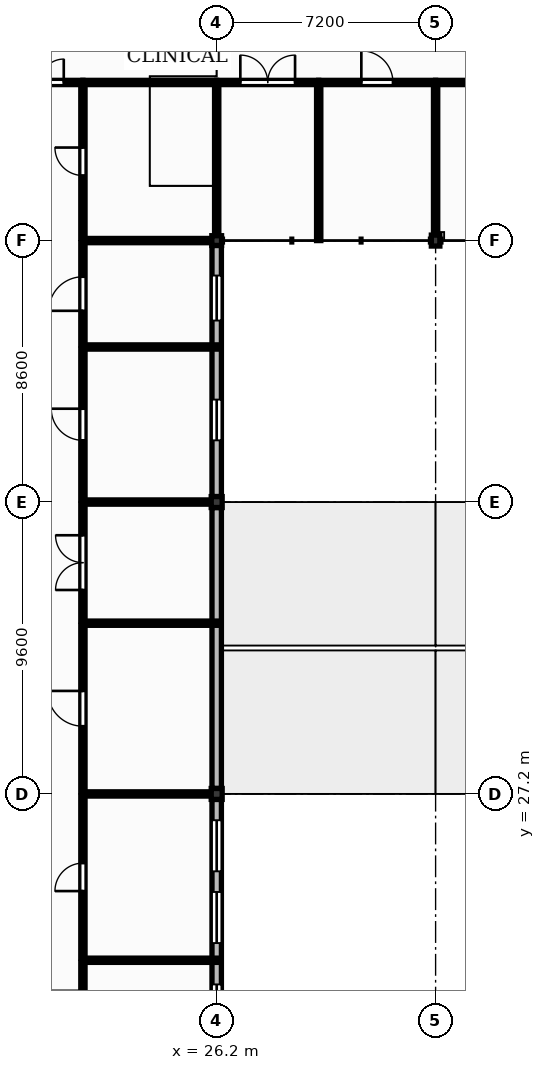
"""IFC4 building model, lengths in metres.
Left out: names, types, materials, properties, quantities, classifications, styles, units other than length and angle.
Written with IfcOpenShell. Run it as: python <this file> out.ifc"""

import sys

from ifc_helpers import new_model, si_unit, direction, frame, frame_2d, origin, origin_2d, place, context, subcontext, project, spatial, rectangle, extrude, element, fill, save


model = new_model("IFC4")
c1 = context("Model", 3, precision=1e-05, world=origin(), true_north=direction((0.0, 1.0)))
c2 = subcontext(c1, "Body", "Model", "MODEL_VIEW")
j1 = project(units=[si_unit("LENGTHUNIT", "METRE"), si_unit("PLANEANGLEUNIT", "RADIAN")], contexts=[c1])
p1 = place(None, origin())
s1 = spatial("IfcSite", under=j1, at=p1, CompositionType="ELEMENT")
p2 = place(p1, origin())
s2 = spatial("IfcBuilding", under=s1, at=p2, CompositionType="ELEMENT")
p3 = place(p2, frame((0.0, 0.0, 9.0)))
s3 = spatial("IfcBuildingStorey", under=s2, at=p3, CompositionType="ELEMENT", Elevation=9.0)
for number, where, z_axis, x_axis in (
    (1, (26.2, 27.2, 0.0), (0.0, 0.0, 1.0), (1.0, 0.0, 0.0)),
    (2, (26.2, 36.8, 0.0), (0.0, 0.0, 1.0), (1.0, 0.0, 0.0)),
):
    element("IfcColumn", number, at=place(p3, frame(where, z_axis=z_axis, x_axis=x_axis)), inside=s3, PredefinedType="COLUMN", context=c2, shape_type="SweptSolid", body=[
        extrude(rectangle(XDim=0.36, YDim=0.36, at=origin_2d()), origin(), (0.0, 0.0, 1.0), 3.95),
    ])
p4 = place(p3, frame((26.2, 45.4, 0.0), z_axis=(0.0, 0.0, 1.0), x_axis=(1.0, 0.0, 0.0)))
e3 = element("IfcColumn", 3, at=p4, inside=s3, PredefinedType="COLUMN", context=c2, shape_type="SweptSolid", body=[
    extrude(rectangle(XDim=0.32, YDim=0.32, at=origin_2d()), origin(), (0.0, 0.0, 1.0), 3.95),
])
p5 = place(p3, frame((33.4, 45.4, 0.0), z_axis=(0.0, 0.0, 1.0), x_axis=(1.0, 0.0, 0.0)))
e4 = element("IfcColumn", 4, at=p5, inside=s3, PredefinedType="COLUMN", context=c2, shape_type="SweptSolid", body=[
    extrude(rectangle(XDim=0.28, YDim=0.36, at=origin_2d()), origin(), (0.0, 0.0, 1.0), 3.99),
])
p6 = place(p3, frame((26.2, 18.78, 0.0), z_axis=(0.0, 0.0, 1.0), x_axis=(0.0, 1.0, 0.0)))
e5 = element("IfcWall", 5, at=p6, inside=s3, PredefinedType="SOLIDWALL", context=c2, shape_type="SweptSolid", body=[
    extrude(rectangle(XDim=8.24, YDim=0.31, at=frame_2d((4.12, 0.0))), origin(), (0.0, 0.0, 1.0), 3.49),
])
p7 = place(p6, frame((0.915, 0.0, 1.0)))
e6 = element("IfcOpeningElement", 6, at=p7, cuts=e5, PredefinedType="OPENING", context=c2, shape_type="SweptSolid", body=[
    extrude(rectangle(XDim=1.24, YDim=1.8, at=frame_2d((0.62, 0.9))), frame((0.0, 0.165, 0.0), z_axis=(0.0, -1.0, 0.0), x_axis=(1.0, 0.0, 0.0)), (0.0, 0.0, 1.0), 0.33),
])
p8 = place(p6, frame((3.515, 0.0, 1.5)))
e7 = element("IfcOpeningElement", 7, at=p8, cuts=e5, PredefinedType="OPENING", context=c2, shape_type="SweptSolid", body=[
    extrude(rectangle(XDim=1.68, YDim=1.25, at=frame_2d((0.84, 0.625))), frame((0.0, 0.165, 0.0), z_axis=(0.0, -1.0, 0.0), x_axis=(1.0, 0.0, 0.0)), (0.0, 0.0, 1.0), 0.33),
])
p9 = place(p6, frame((5.875, 0.0, 1.5)))
e8 = element("IfcOpeningElement", 8, at=p9, cuts=e5, PredefinedType="OPENING", context=c2, shape_type="SweptSolid", body=[
    extrude(rectangle(XDim=1.68, YDim=1.25, at=frame_2d((0.84, 0.625))), frame((0.0, 0.165, 0.0), z_axis=(0.0, -1.0, 0.0), x_axis=(1.0, 0.0, 0.0)), (0.0, 0.0, 1.0), 0.33),
])
p10 = place(p3, frame((26.2, 27.38, 0.0), z_axis=(0.0, 0.0, 1.0), x_axis=(0.0, 1.0, 0.0)))
e9 = element("IfcWall", 9, at=p10, inside=s3, PredefinedType="SOLIDWALL", context=c2, shape_type="SweptSolid", body=[
    extrude(rectangle(XDim=9.24, YDim=0.31, at=frame_2d((4.62, 0.0))), origin(), (0.0, 0.0, 1.0), 3.49),
])
p11 = place(p3, frame((26.2, 36.98, 0.0), z_axis=(0.0, 0.0, 1.0), x_axis=(0.0, 1.0, 0.0)))
e10 = element("IfcWall", 10, at=p11, inside=s3, PredefinedType="SOLIDWALL", context=c2, shape_type="SweptSolid", body=[
    extrude(rectangle(XDim=8.26, YDim=0.31, at=frame_2d((4.13, 0.0))), origin(), (0.0, 0.0, 1.0), 3.49),
])
p12 = place(p11, frame((1.85, 0.0, 1.0)))
e11 = element("IfcOpeningElement", 11, at=p12, cuts=e10, PredefinedType="OPENING", context=c2, shape_type="SweptSolid", body=[
    extrude(rectangle(XDim=1.34, YDim=1.95, at=frame_2d((0.67, 0.975))), frame((0.0, 0.165, 0.0), z_axis=(0.0, -1.0, 0.0), x_axis=(1.0, 0.0, 0.0)), (0.0, 0.0, 1.0), 0.33),
])
p13 = place(p11, frame((5.79, 0.0, 1.0)))
e12 = element("IfcOpeningElement", 12, at=p13, cuts=e10, PredefinedType="OPENING", context=c2, shape_type="SweptSolid", body=[
    extrude(rectangle(XDim=1.48, YDim=1.95, at=frame_2d((0.74, 0.975))), frame((0.0, 0.165, 0.0), z_axis=(0.0, -1.0, 0.0), x_axis=(1.0, 0.0, 0.0)), (0.0, 0.0, 1.0), 0.33),
])
p14 = place(p3, frame((19.0, 50.6, 0.0), z_axis=(0.0, 0.0, 1.0), x_axis=(1.0, 0.0, 0.0)))
e13 = element("IfcWall", 13, at=p14, inside=s3, PredefinedType="PARTITIONING", context=c2, shape_type="SweptSolid", body=[
    extrude(rectangle(XDim=2.8, YDim=0.14, at=frame_2d((1.4, 0.0))), origin(), (0.0, 0.0, 1.0), 3.96),
])
p15 = place(p14, frame((0.63, 0.0, 0.0)))
e14 = element("IfcOpeningElement", 14, at=p15, cuts=e13, PredefinedType="OPENING", context=c2, shape_type="SweptSolid", body=[
    extrude(rectangle(XDim=1.54, YDim=2.25, at=frame_2d((0.77, 1.125))), frame((0.0, 0.08, 0.0), z_axis=(0.0, -1.0, 0.0), x_axis=(1.0, 0.0, 0.0)), (0.0, 0.0, 1.0), 0.16),
])
p16 = place(p3, frame((21.8, 18.67, 0.0), z_axis=(0.0, 0.0, 1.0), x_axis=(0.0, 1.0, 0.0)))
e15 = element("IfcWall", 15, at=p16, inside=s3, PredefinedType="PARTITIONING", context=c2, shape_type="SweptSolid", body=[
    extrude(rectangle(XDim=2.99, YDim=0.14, at=frame_2d((1.495, 0.0))), origin(), (0.0, 0.0, 1.0), 3.96),
])
p17 = place(p16, frame((0.935, 0.0, 0.0)))
e16 = element("IfcOpeningElement", 16, at=p17, cuts=e15, PredefinedType="OPENING", context=c2, shape_type="SweptSolid", body=[
    extrude(rectangle(XDim=1.12, YDim=2.15, at=frame_2d((0.56, 1.075))), frame((0.0, 0.08, 0.0), z_axis=(0.0, -1.0, 0.0), x_axis=(1.0, 0.0, 0.0)), (0.0, 0.0, 1.0), 0.16),
])
p18 = place(p3, frame((21.8, 21.8, 0.0), z_axis=(0.0, 0.0, 1.0), x_axis=(0.0, 1.0, 0.0)))
e17 = element("IfcWall", 17, at=p18, inside=s3, PredefinedType="PARTITIONING", context=c2, shape_type="SweptSolid", body=[
    extrude(rectangle(XDim=5.33, YDim=0.14, at=frame_2d((2.665, 0.0))), origin(), (0.0, 0.0, 1.0), 3.96),
])
p19 = place(p18, frame((2.205, 0.0, 0.0)))
e18 = element("IfcOpeningElement", 18, at=p19, cuts=e17, PredefinedType="OPENING", context=c2, shape_type="SweptSolid", body=[
    extrude(rectangle(XDim=0.92, YDim=2.1, at=frame_2d((0.46, 1.05))), frame((0.0, 0.08, 0.0), z_axis=(0.0, -1.0, 0.0), x_axis=(1.0, 0.0, 0.0)), (0.0, 0.0, 1.0), 0.16),
])
p20 = place(p3, frame((21.8, 21.73, 0.0), z_axis=(0.0, 0.0, 1.0), x_axis=(1.0, 0.0, 0.0)))
e19 = element("IfcWall", 19, at=p20, inside=s3, PredefinedType="PARTITIONING", context=c2, shape_type="SweptSolid", body=[
    extrude(rectangle(XDim=4.4, YDim=0.14, at=frame_2d((2.2, 0.0))), origin(), (0.0, 0.0, 1.0), 3.96),
])
p21 = place(p3, frame((21.8, 27.27, 0.0), z_axis=(0.0, 0.0, 1.0), x_axis=(0.0, 1.0, 0.0)))
e20 = element("IfcWall", 20, at=p21, inside=s3, PredefinedType="PARTITIONING", context=c2, shape_type="SweptSolid", body=[
    extrude(rectangle(XDim=5.476, YDim=0.14, at=frame_2d((2.738, 0.0))), origin(), (0.0, 0.0, 1.0), 3.96),
])
p22 = place(p21, frame((2.158, 0.0, 0.0)))
e21 = element("IfcOpeningElement", 21, at=p22, cuts=e20, PredefinedType="OPENING", context=c2, shape_type="SweptSolid", body=[
    extrude(rectangle(XDim=1.16, YDim=2.1, at=frame_2d((0.58, 1.05))), frame((0.0, 0.08, 0.0), z_axis=(0.0, -1.0, 0.0), x_axis=(1.0, 0.0, 0.0)), (0.0, 0.0, 1.0), 0.16),
])
p23 = place(p3, frame((21.8, 27.2, 0.0), z_axis=(0.0, 0.0, 1.0), x_axis=(1.0, 0.0, 0.0)))
e22 = element("IfcWall", 22, at=p23, inside=s3, PredefinedType="PARTITIONING", context=c2, shape_type="SweptSolid", body=[
    extrude(rectangle(XDim=4.22, YDim=0.14, at=frame_2d((2.11, 0.0))), origin(), (0.0, 0.0, 1.0), 3.49),
])
p24 = place(p3, frame((21.8, 32.886, 0.0), z_axis=(0.0, 0.0, 1.0), x_axis=(0.0, 1.0, 0.0)))
e23 = element("IfcWall", 23, at=p24, inside=s3, PredefinedType="PARTITIONING", context=c2, shape_type="SweptSolid", body=[
    extrude(rectangle(XDim=3.844, YDim=0.14, at=frame_2d((1.922, 0.0))), origin(), (0.0, 0.0, 1.0), 3.96),
])
p25 = place(p24, frame((1.022, 0.0, 0.0)))
e24 = element("IfcOpeningElement", 24, at=p25, cuts=e23, PredefinedType="OPENING", context=c2, shape_type="SweptSolid", body=[
    extrude(rectangle(XDim=1.8, YDim=2.3, at=frame_2d((0.9, 1.15))), frame((0.0, 0.08, 0.0), z_axis=(0.0, -1.0, 0.0), x_axis=(1.0, 0.0, 0.0)), (0.0, 0.0, 1.0), 0.16),
])
p26 = place(p3, frame((21.8, 32.816, 0.0), z_axis=(0.0, 0.0, 1.0), x_axis=(1.0, 0.0, 0.0)))
e25 = element("IfcWall", 25, at=p26, inside=s3, PredefinedType="PARTITIONING", context=c2, shape_type="SweptSolid", body=[
    extrude(rectangle(XDim=4.4, YDim=0.14, at=frame_2d((2.2, 0.0))), origin(), (0.0, 0.0, 1.0), 3.96),
])
p27 = place(p3, frame((21.8, 36.87, 0.0), z_axis=(0.0, 0.0, 1.0), x_axis=(0.0, 1.0, 0.0)))
e26 = element("IfcWall", 26, at=p27, inside=s3, PredefinedType="PARTITIONING", context=c2, shape_type="SweptSolid", body=[
    extrude(rectangle(XDim=4.96, YDim=0.14, at=frame_2d((2.48, 0.0))), origin(), (0.0, 0.0, 1.0), 3.96),
])
p28 = place(p27, frame((1.96, 0.0, 0.0)))
e27 = element("IfcOpeningElement", 27, at=p28, cuts=e26, PredefinedType="OPENING", context=c2, shape_type="SweptSolid", body=[
    extrude(rectangle(XDim=1.04, YDim=2.1, at=frame_2d((0.52, 1.05))), frame((0.0, 0.08, 0.0), z_axis=(0.0, -1.0, 0.0), x_axis=(1.0, 0.0, 0.0)), (0.0, 0.0, 1.0), 0.16),
])
p29 = place(p3, frame((21.8, 36.8, 0.0), z_axis=(0.0, 0.0, 1.0), x_axis=(1.0, 0.0, 0.0)))
e28 = element("IfcWall", 28, at=p29, inside=s3, PredefinedType="PARTITIONING", context=c2, shape_type="SweptSolid", body=[
    extrude(rectangle(XDim=4.22, YDim=0.14, at=frame_2d((2.11, 0.0))), origin(), (0.0, 0.0, 1.0), 3.49),
])
p30 = place(p3, frame((21.8, 41.97, 0.0), z_axis=(0.0, 0.0, 1.0), x_axis=(0.0, 1.0, 0.0)))
e29 = element("IfcWall", 29, at=p30, inside=s3, PredefinedType="PARTITIONING", context=c2, shape_type="SweptSolid", body=[
    extrude(rectangle(XDim=3.36, YDim=0.14, at=frame_2d((1.68, 0.0))), origin(), (0.0, 0.0, 1.0), 3.96),
])
p31 = place(p30, frame((1.12, 0.0, 0.0)))
e30 = element("IfcOpeningElement", 30, at=p31, cuts=e29, PredefinedType="OPENING", context=c2, shape_type="SweptSolid", body=[
    extrude(rectangle(XDim=1.12, YDim=2.15, at=frame_2d((0.56, 1.075))), frame((0.0, 0.08, 0.0), z_axis=(0.0, -1.0, 0.0), x_axis=(1.0, 0.0, 0.0)), (0.0, 0.0, 1.0), 0.16),
])
p32 = place(p3, frame((21.8, 41.9, 0.0), z_axis=(0.0, 0.0, 1.0), x_axis=(1.0, 0.0, 0.0)))
e31 = element("IfcWall", 31, at=p32, inside=s3, PredefinedType="PARTITIONING", context=c2, shape_type="SweptSolid", body=[
    extrude(rectangle(XDim=4.4, YDim=0.14, at=frame_2d((2.2, 0.0))), origin(), (0.0, 0.0, 1.0), 3.96),
])
p33 = place(p3, frame((21.8, 45.47, 0.0), z_axis=(0.0, 0.0, 1.0), x_axis=(0.0, 1.0, 0.0)))
e32 = element("IfcWall", 32, at=p33, inside=s3, PredefinedType="PARTITIONING", context=c2, shape_type="SweptSolid", body=[
    extrude(rectangle(XDim=5.06, YDim=0.14, at=frame_2d((2.53, 0.0))), origin(), (0.0, 0.0, 1.0), 3.96),
])
p34 = place(p33, frame((2.07, 0.0, 0.0)))
e33 = element("IfcOpeningElement", 33, at=p34, cuts=e32, PredefinedType="OPENING", context=c2, shape_type="SweptSolid", body=[
    extrude(rectangle(XDim=0.92, YDim=2.1, at=frame_2d((0.46, 1.05))), frame((0.0, 0.08, 0.0), z_axis=(0.0, -1.0, 0.0), x_axis=(1.0, 0.0, 0.0)), (0.0, 0.0, 1.0), 0.16),
])
p35 = place(p3, frame((21.8, 45.4, 0.0), z_axis=(0.0, 0.0, 1.0), x_axis=(1.0, 0.0, 0.0)))
e34 = element("IfcWall", 34, at=p35, inside=s3, PredefinedType="PARTITIONING", context=c2, shape_type="SweptSolid", body=[
    extrude(rectangle(XDim=4.24, YDim=0.14, at=frame_2d((2.12, 0.0))), origin(), (0.0, 0.0, 1.0), 3.49),
])
p36 = place(p3, frame((21.8, 50.6, 0.0), z_axis=(0.0, 0.0, 1.0), x_axis=(1.0, 0.0, 0.0)))
e35 = element("IfcWall", 35, at=p36, inside=s3, PredefinedType="PARTITIONING", context=c2, shape_type="SweptSolid", body=[
    extrude(rectangle(XDim=4.4, YDim=0.14, at=frame_2d((2.2, 0.0))), origin(), (0.0, 0.0, 1.0), 3.96),
])
p37 = place(p3, frame((26.2, 45.56, 0.0), z_axis=(0.0, 0.0, 1.0), x_axis=(0.0, 1.0, 0.0)))
e36 = element("IfcWall", 36, at=p37, inside=s3, PredefinedType="PARTITIONING", context=c2, shape_type="SweptSolid", body=[
    extrude(rectangle(XDim=4.97, YDim=0.14, at=frame_2d((2.485, 0.0))), origin(), (0.0, 0.0, 1.0), 3.43),
])
p38 = place(p3, frame((26.2, 50.6, 0.0), z_axis=(0.0, 0.0, 1.0), x_axis=(1.0, 0.0, 0.0)))
e37 = element("IfcWall", 37, at=p38, inside=s3, PredefinedType="PARTITIONING", context=c2, shape_type="SweptSolid", body=[
    extrude(rectangle(XDim=3.355, YDim=0.14, at=frame_2d((1.677, 0.0))), origin(), (0.0, 0.0, 1.0), 3.96),
])
p39 = place(p38, frame((0.778, 0.0, 0.0)))
e38 = element("IfcOpeningElement", 38, at=p39, cuts=e37, PredefinedType="OPENING", context=c2, shape_type="SweptSolid", body=[
    extrude(rectangle(XDim=1.8, YDim=2.3, at=frame_2d((0.9, 1.15))), frame((0.0, 0.08, 0.0), z_axis=(0.0, -1.0, 0.0), x_axis=(1.0, 0.0, 0.0)), (0.0, 0.0, 1.0), 0.16),
])
p40 = place(p3, frame((29.555, 45.4, 0.0), z_axis=(0.0, 0.0, 1.0), x_axis=(0.0, 1.0, 0.0)))
e39 = element("IfcWall", 39, at=p40, inside=s3, PredefinedType="PARTITIONING", context=c2, shape_type="SweptSolid", body=[
    extrude(rectangle(XDim=5.13, YDim=0.14, at=frame_2d((2.565, 0.0))), origin(), (0.0, 0.0, 1.0), 3.96),
])
p41 = place(p3, frame((29.555, 50.6, 0.0), z_axis=(0.0, 0.0, 1.0), x_axis=(1.0, 0.0, 0.0)))
e40 = element("IfcWall", 40, at=p41, inside=s3, PredefinedType="PARTITIONING", context=c2, shape_type="SweptSolid", body=[
    extrude(rectangle(XDim=3.845, YDim=0.14, at=frame_2d((1.922, 0.0))), origin(), (0.0, 0.0, 1.0), 3.96),
])
p42 = place(p41, frame((1.403, 0.0, 0.0)))
e41 = element("IfcOpeningElement", 41, at=p42, cuts=e40, PredefinedType="OPENING", context=c2, shape_type="SweptSolid", body=[
    extrude(rectangle(XDim=1.04, YDim=2.1, at=frame_2d((0.52, 1.05))), frame((0.0, 0.08, 0.0), z_axis=(0.0, -1.0, 0.0), x_axis=(1.0, 0.0, 0.0)), (0.0, 0.0, 1.0), 0.16),
])
p43 = place(p3, frame((33.4, 45.58, 0.0), z_axis=(0.0, 0.0, 1.0), x_axis=(0.0, 1.0, 0.0)))
e42 = element("IfcWall", 42, at=p43, inside=s3, PredefinedType="PARTITIONING", context=c2, shape_type="SweptSolid", body=[
    extrude(rectangle(XDim=4.95, YDim=0.14, at=frame_2d((2.475, 0.0))), origin(), (0.0, 0.0, 1.0), 3.47),
])
p44 = place(p3, frame((33.4, 50.6, 0.0), z_axis=(0.0, 0.0, 1.0), x_axis=(1.0, 0.0, 0.0)))
e43 = element("IfcWall", 43, at=p44, inside=s3, PredefinedType="PARTITIONING", context=c2, shape_type="SweptSolid", body=[
    extrude(rectangle(XDim=7.2, YDim=0.14, at=frame_2d((3.6, 0.0))), origin(), (0.0, 0.0, 1.0), 3.96),
])
p45 = place(p44, frame((3.04, 0.0, 0.0)))
e44 = element("IfcOpeningElement", 44, at=p45, cuts=e43, PredefinedType="OPENING", context=c2, shape_type="SweptSolid", body=[
    extrude(rectangle(XDim=1.12, YDim=2.15, at=frame_2d((0.56, 1.075))), frame((0.0, 0.08, 0.0), z_axis=(0.0, -1.0, 0.0), x_axis=(1.0, 0.0, 0.0)), (0.0, 0.0, 1.0), 0.16),
])
p46 = place(p7, origin())
e45 = element("IfcWindow", 45, at=p46, inside=s3, PartitioningType="SINGLE_PANEL", PredefinedType="WINDOW", context=c2, shape_type="SweptSolid", body=[
    extrude(rectangle(XDim=1.24, YDim=1.8, at=frame_2d((0.62, 0.9))), frame((0.0, 0.03, 0.0), z_axis=(0.0, -1.0, 0.0), x_axis=(1.0, 0.0, 0.0)), (0.0, 0.0, 1.0), 0.06),
])
fill(e6, e45)
p47 = place(p8, origin())
e46 = element("IfcWindow", 46, at=p47, inside=s3, PartitioningType="DOUBLE_PANEL_VERTICAL", PredefinedType="WINDOW", context=c2, shape_type="SweptSolid", body=[
    extrude(rectangle(XDim=1.68, YDim=1.25, at=frame_2d((0.84, 0.625))), frame((0.0, 0.03, 0.0), z_axis=(0.0, -1.0, 0.0), x_axis=(1.0, 0.0, 0.0)), (0.0, 0.0, 1.0), 0.06),
])
fill(e7, e46)
p48 = place(p9, origin())
e47 = element("IfcWindow", 47, at=p48, inside=s3, PartitioningType="DOUBLE_PANEL_VERTICAL", PredefinedType="WINDOW", context=c2, shape_type="SweptSolid", body=[
    extrude(rectangle(XDim=1.68, YDim=1.25, at=frame_2d((0.84, 0.625))), frame((0.0, 0.03, 0.0), z_axis=(0.0, -1.0, 0.0), x_axis=(1.0, 0.0, 0.0)), (0.0, 0.0, 1.0), 0.06),
])
fill(e8, e47)
p49 = place(p12, origin())
e48 = element("IfcWindow", 48, at=p49, inside=s3, PartitioningType="SINGLE_PANEL", PredefinedType="WINDOW", context=c2, shape_type="SweptSolid", body=[
    extrude(rectangle(XDim=1.34, YDim=1.95, at=frame_2d((0.67, 0.975))), frame((0.0, 0.03, 0.0), z_axis=(0.0, -1.0, 0.0), x_axis=(1.0, 0.0, 0.0)), (0.0, 0.0, 1.0), 0.06),
])
fill(e11, e48)
p50 = place(p13, origin())
e49 = element("IfcWindow", 49, at=p50, inside=s3, PartitioningType="SINGLE_PANEL", PredefinedType="WINDOW", context=c2, shape_type="SweptSolid", body=[
    extrude(rectangle(XDim=1.48, YDim=1.95, at=frame_2d((0.74, 0.975))), frame((0.0, 0.03, 0.0), z_axis=(0.0, -1.0, 0.0), x_axis=(1.0, 0.0, 0.0)), (0.0, 0.0, 1.0), 0.06),
])
fill(e12, e49)
p51 = place(p15, origin())
e50 = element("IfcDoor", 50, at=p51, inside=s3, OperationType="DOUBLE_DOOR_SINGLE_SWING", PredefinedType="DOOR", context=c2, shape_type="SweptSolid", body=[
    extrude(rectangle(XDim=1.54, YDim=2.25, at=frame_2d((0.77, 1.125))), frame((0.0, 0.025, 0.0), z_axis=(0.0, -1.0, 0.0), x_axis=(1.0, 0.0, 0.0)), (0.0, 0.0, 1.0), 0.05),
])
fill(e14, e50)
p52 = place(p19, origin())
e51 = element("IfcDoor", 51, at=p52, inside=s3, OperationType="SINGLE_SWING_LEFT", PredefinedType="DOOR", context=c2, shape_type="SweptSolid", body=[
    extrude(rectangle(XDim=0.92, YDim=2.1, at=frame_2d((0.46, 1.05))), frame((0.0, 0.025, 0.0), z_axis=(0.0, -1.0, 0.0), x_axis=(1.0, 0.0, 0.0)), (0.0, 0.0, 1.0), 0.05),
])
fill(e18, e51)
p53 = place(p22, origin())
e52 = element("IfcDoor", 52, at=p53, inside=s3, OperationType="SINGLE_SWING_RIGHT", PredefinedType="DOOR", context=c2, shape_type="SweptSolid", body=[
    extrude(rectangle(XDim=1.16, YDim=2.1, at=frame_2d((0.58, 1.05))), frame((0.0, 0.025, 0.0), z_axis=(0.0, -1.0, 0.0), x_axis=(1.0, 0.0, 0.0)), (0.0, 0.0, 1.0), 0.05),
])
fill(e21, e52)
p54 = place(p25, origin())
e53 = element("IfcDoor", 53, at=p54, inside=s3, OperationType="DOUBLE_DOOR_SINGLE_SWING", PredefinedType="DOOR", context=c2, shape_type="SweptSolid", body=[
    extrude(rectangle(XDim=1.8, YDim=2.3, at=frame_2d((0.9, 1.15))), frame((0.0, 0.025, 0.0), z_axis=(0.0, -1.0, 0.0), x_axis=(1.0, 0.0, 0.0)), (0.0, 0.0, 1.0), 0.05),
])
fill(e24, e53)
p55 = place(p28, origin())
e54 = element("IfcDoor", 54, at=p55, inside=s3, OperationType="SINGLE_SWING_RIGHT", PredefinedType="DOOR", context=c2, shape_type="SweptSolid", body=[
    extrude(rectangle(XDim=1.04, YDim=2.1, at=frame_2d((0.52, 1.05))), frame((0.0, 0.025, 0.0), z_axis=(0.0, -1.0, 0.0), x_axis=(1.0, 0.0, 0.0)), (0.0, 0.0, 1.0), 0.05),
])
fill(e27, e54)
p56 = place(p31, origin())
e55 = element("IfcDoor", 55, at=p56, inside=s3, OperationType="SINGLE_SWING_LEFT", PredefinedType="DOOR", context=c2, shape_type="SweptSolid", body=[
    extrude(rectangle(XDim=1.12, YDim=2.15, at=frame_2d((0.56, 1.075))), frame((0.0, 0.025, 0.0), z_axis=(0.0, -1.0, 0.0), x_axis=(1.0, 0.0, 0.0)), (0.0, 0.0, 1.0), 0.05),
])
fill(e30, e55)
p57 = place(p34, origin())
e56 = element("IfcDoor", 56, at=p57, inside=s3, OperationType="SINGLE_SWING_RIGHT", PredefinedType="DOOR", context=c2, shape_type="SweptSolid", body=[
    extrude(rectangle(XDim=0.92, YDim=2.1, at=frame_2d((0.46, 1.05))), frame((0.0, 0.025, 0.0), z_axis=(0.0, -1.0, 0.0), x_axis=(1.0, 0.0, 0.0)), (0.0, 0.0, 1.0), 0.05),
])
fill(e33, e56)
p58 = place(p39, origin())
e57 = element("IfcDoor", 57, at=p58, inside=s3, OperationType="DOUBLE_DOOR_SINGLE_SWING", PredefinedType="DOOR", context=c2, shape_type="SweptSolid", body=[
    extrude(rectangle(XDim=1.8, YDim=2.3, at=frame_2d((0.9, 1.15))), frame((0.0, 0.025, 0.0), z_axis=(0.0, -1.0, 0.0), x_axis=(1.0, 0.0, 0.0)), (0.0, 0.0, 1.0), 0.05),
])
fill(e38, e57)
p59 = place(p42, origin())
e58 = element("IfcDoor", 58, at=p59, inside=s3, OperationType="SINGLE_SWING_LEFT", PredefinedType="DOOR", context=c2, shape_type="SweptSolid", body=[
    extrude(rectangle(XDim=1.04, YDim=2.1, at=frame_2d((0.52, 1.05))), frame((0.0, 0.025, 0.0), z_axis=(0.0, -1.0, 0.0), x_axis=(1.0, 0.0, 0.0)), (0.0, 0.0, 1.0), 0.05),
])
fill(e41, e58)
save(model, sys.argv[1])
